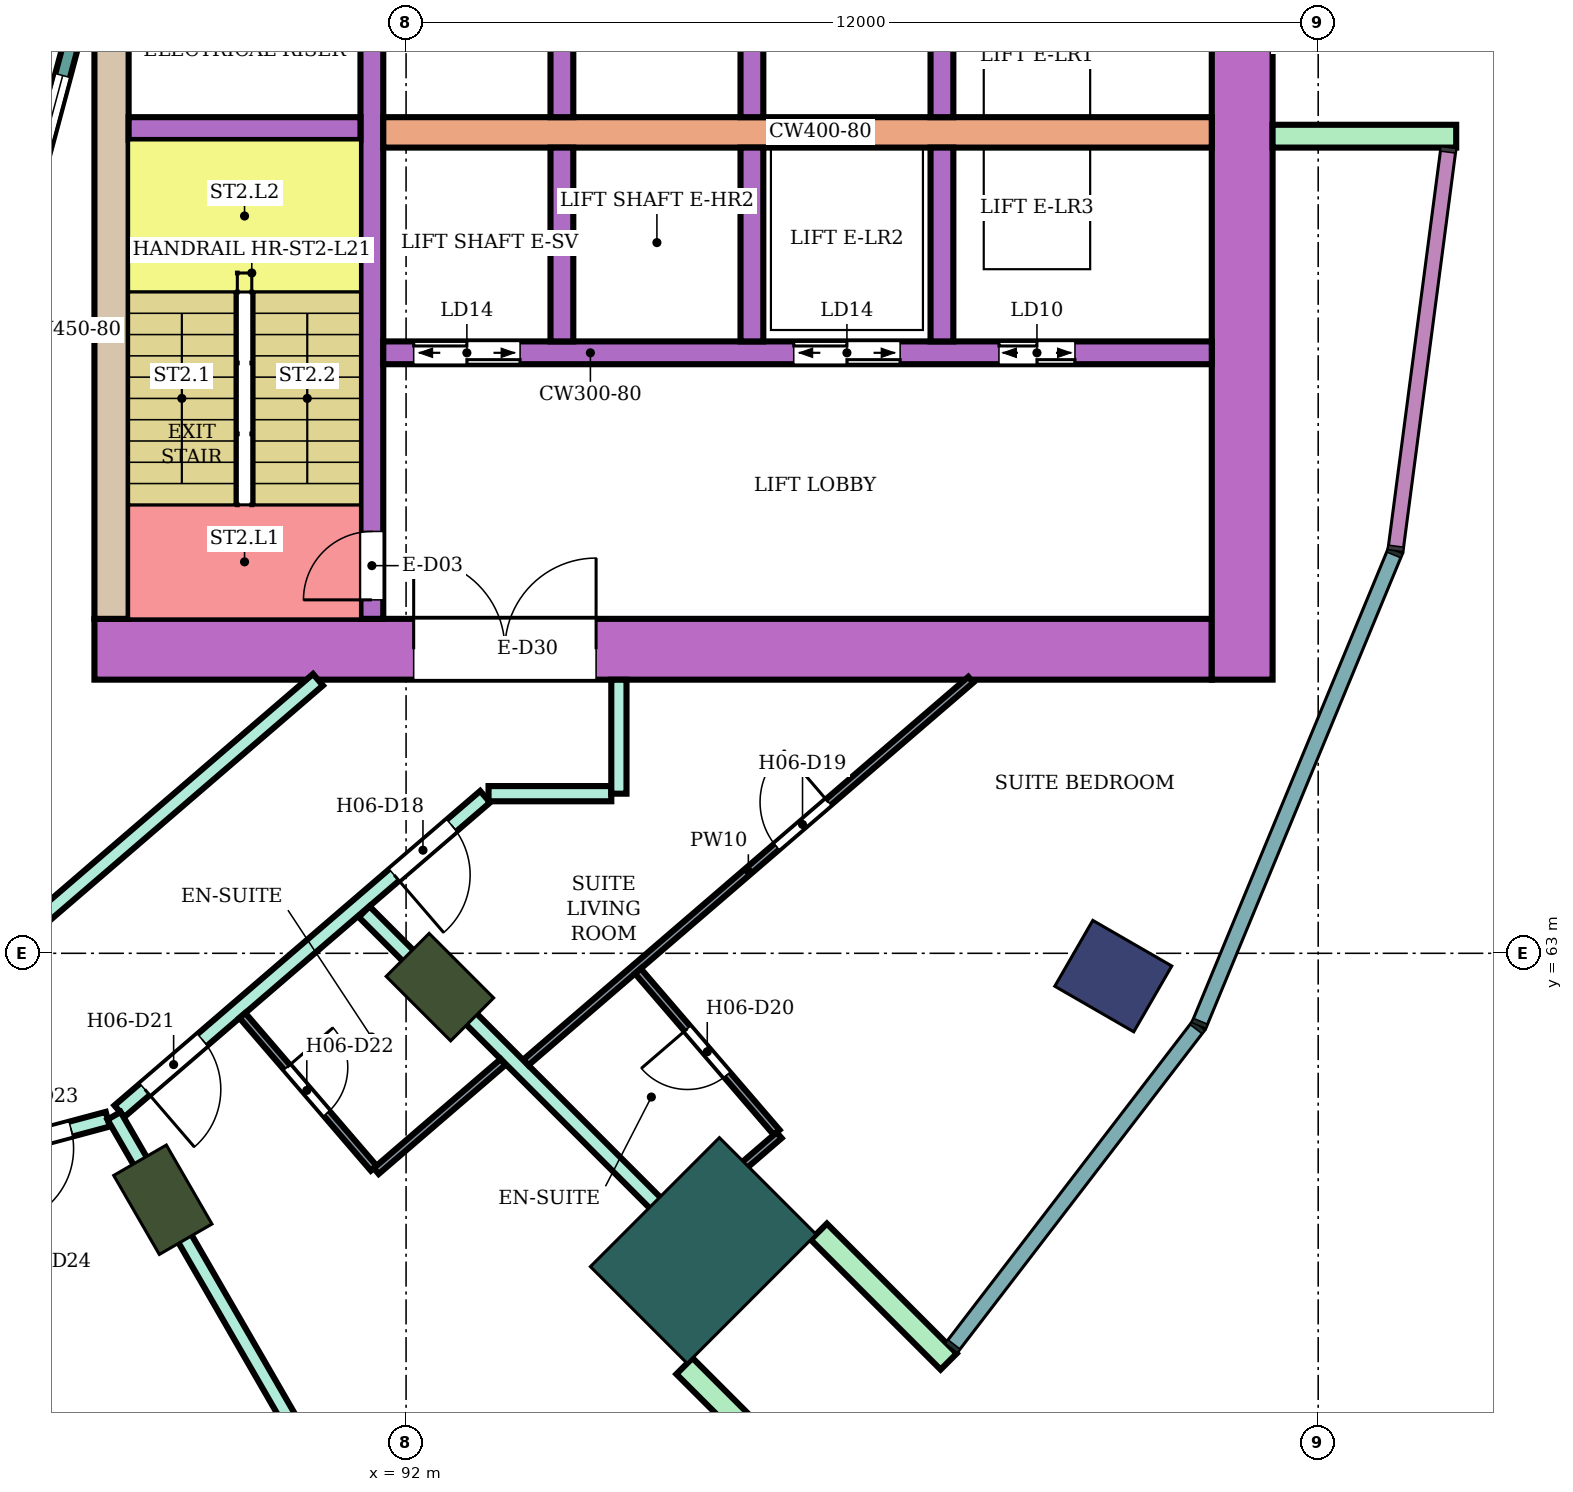
"""IFC4 building model, lengths in metres.
Left out: names, types, materials, properties, quantities, classifications, styles, units other than length and angle.
Written with IfcOpenShell. Run it as: python <this file> out.ifc"""

import sys

from ifc_helpers import new_model, si_unit, direction, frame, frame_2d, origin, origin_2d, place, context, subcontext, project, spatial, rectangle, extrude, element, fill, save


model = new_model("IFC4")
c1 = context("Model", 3, precision=1e-05, world=origin(), true_north=direction((0.0, 1.0)))
c2 = subcontext(c1, "Body", "Model", "MODEL_VIEW")
j1 = project(units=[si_unit("LENGTHUNIT", "METRE"), si_unit("PLANEANGLEUNIT", "RADIAN")], contexts=[c1])
p1 = place(None, origin())
s1 = spatial("IfcSite", under=j1, at=p1, CompositionType="ELEMENT")
p2 = place(p1, origin())
s2 = spatial("IfcBuilding", under=s1, at=p2, CompositionType="ELEMENT")
p3 = place(p2, frame((0.0, 0.0, 93.8)))
s3 = spatial("IfcBuildingStorey", under=s2, at=p3, CompositionType="ELEMENT", Elevation=93.8)
p4 = place(p3, frame((101.304, 62.7, 0.0), z_axis=(0.0, 0.0, 1.0), x_axis=(0.866025403784, -0.5, 0.0)))
e1 = element("IfcColumn", 1, at=p4, inside=s3, PredefinedType="COLUMN", context=c2, shape_type="SweptSolid", body=[
    extrude(rectangle(XDim=1.2, YDim=1.0, at=origin_2d()), origin(), (0.0, 0.0, 1.0), 3.8),
])
for number, where, z_axis, x_axis in (
    (2, (88.8, 59.758, 0.0), (0.0, 0.0, 1.0), (0.5, -0.866, 0.0)),
    (3, (92.445, 62.555, 0.0), (0.0, 0.0, 1.0), (0.707, -0.707, 0.0)),
):
    element("IfcColumn", number, at=place(p3, frame(where, z_axis=z_axis, x_axis=x_axis)), inside=s3, PredefinedType="COLUMN", context=c2, shape_type="SweptSolid", body=[
        extrude(rectangle(XDim=1.2, YDim=0.8, at=origin_2d()), origin(), (0.0, 0.0, 1.0), 3.8),
    ])
p5 = place(p3, frame((95.91, 59.09, 0.0), z_axis=(0.0, 0.0, 1.0), x_axis=(0.707106781187, -0.707106781187, 0.0)))
e4 = element("IfcColumn", 4, at=p5, inside=s3, PredefinedType="COLUMN", context=c2, shape_type="SweptSolid", body=[
    extrude(rectangle(XDim=1.8, YDim=2.4, at=origin_2d()), origin(), (0.0, 0.0, 1.0), 3.8),
])
p6 = place(p3, frame((87.9, 67.0, 0.0), z_axis=(0.0, 0.0, 1.0), x_axis=(1.0, 0.0, 0.0)))
e5 = element("IfcWall", 5, at=p6, inside=s3, PredefinedType="SHEAR", context=c2, shape_type="SweptSolid", body=[
    extrude(rectangle(XDim=14.7, YDim=0.8, at=frame_2d((7.35, 0.0))), origin(), (0.0, 0.0, 1.0), 3.48),
])
p7 = place(p6, frame((4.2, 0.0, 0.0)))
e6 = element("IfcOpeningElement", 6, at=p7, cuts=e5, PredefinedType="OPENING", context=c2, shape_type="SweptSolid", body=[
    extrude(rectangle(XDim=2.4, YDim=2.4, at=frame_2d((1.2, 1.2))), frame((0.0, 0.41, 0.0), z_axis=(0.0, -1.0, 0.0), x_axis=(1.0, 0.0, 0.0)), (0.0, 0.0, 1.0), 0.82),
])
p8 = place(p3, frame((88.125, 67.4, 0.0), z_axis=(0.0, 0.0, 1.0), x_axis=(0.0, 1.0, 0.0)))
e7 = element("IfcWall", 7, at=p8, inside=s3, PredefinedType="SHEAR", context=c2, shape_type="SweptSolid", body=[
    extrude(rectangle(XDim=7.6, YDim=0.45, at=frame_2d((3.8, 0.0))), origin(), (0.0, 0.0, 1.0), 3.48),
])
p9 = place(p3, frame((103.0, 66.6, 0.0), z_axis=(0.0, 0.0, 1.0), x_axis=(0.0, 1.0, 0.0)))
e8 = element("IfcWall", 8, at=p9, inside=s3, PredefinedType="SHEAR", context=c2, shape_type="SweptSolid", body=[
    extrude(rectangle(XDim=16.8, YDim=0.8, at=frame_2d((8.4, 0.0))), origin(), (0.0, 0.0, 1.0), 3.48),
])
p10 = place(p3, frame((91.55, 67.4, 0.0), z_axis=(0.0, 0.0, 1.0), x_axis=(0.0, 1.0, 0.0)))
e9 = element("IfcWall", 9, at=p10, inside=s3, PredefinedType="SHEAR", context=c2, shape_type="SweptSolid", body=[
    extrude(rectangle(XDim=7.6, YDim=0.3, at=frame_2d((3.8, 0.0))), origin(), (0.0, 0.0, 1.0), 3.48),
])
p11 = place(p10, frame((0.25, 0.0, 0.0)))
e10 = element("IfcOpeningElement", 10, at=p11, cuts=e9, PredefinedType="OPENING", context=c2, shape_type="SweptSolid", body=[
    extrude(rectangle(XDim=0.9, YDim=2.1, at=frame_2d((0.45, 1.05))), frame((0.0, 0.16, 0.0), z_axis=(0.0, -1.0, 0.0), x_axis=(1.0, 0.0, 0.0)), (0.0, 0.0, 1.0), 0.32),
])
p12 = place(p3, frame((88.35, 73.85, 0.0), z_axis=(0.0, 0.0, 1.0), x_axis=(1.0, 0.0, 0.0)))
e11 = element("IfcWall", 11, at=p12, inside=s3, PredefinedType="SHEAR", context=c2, shape_type="SweptSolid", body=[
    extrude(rectangle(XDim=3.05, YDim=0.3, at=frame_2d((1.525, 0.0))), origin(), (0.0, 0.0, 1.0), 3.48),
])
p13 = place(p3, frame((91.7, 73.8, 0.0), z_axis=(0.0, 0.0, 1.0), x_axis=(1.0, 0.0, 0.0)))
e12 = element("IfcWall", 12, at=p13, inside=s3, PredefinedType="SHEAR", context=c2, shape_type="SweptSolid", body=[
    extrude(rectangle(XDim=10.9, YDim=0.4, at=frame_2d((5.45, 0.0))), origin(), (0.0, 0.0, 1.0), 3.48),
])
p14 = place(p3, frame((91.7, 70.9, 0.0), z_axis=(0.0, 0.0, 1.0), x_axis=(1.0, 0.0, 0.0)))
e13 = element("IfcWall", 13, at=p14, inside=s3, PredefinedType="SHEAR", context=c2, shape_type="SweptSolid", body=[
    extrude(rectangle(XDim=10.9, YDim=0.3, at=frame_2d((5.45, 0.0))), origin(), (0.0, 0.0, 1.0), 3.48),
])
p15 = place(p14, frame((0.4, 0.0, 0.0)))
e14 = element("IfcOpeningElement", 14, at=p15, cuts=e13, PredefinedType="OPENING", context=c2, shape_type="SweptSolid", body=[
    extrude(rectangle(XDim=1.4, YDim=2.1, at=frame_2d((0.7, 1.05))), frame((0.0, 0.16, 0.0), z_axis=(0.0, -1.0, 0.0), x_axis=(1.0, 0.0, 0.0)), (0.0, 0.0, 1.0), 0.32),
])
p16 = place(p14, frame((5.4, 0.0, 0.0)))
e15 = element("IfcOpeningElement", 15, at=p16, cuts=e13, PredefinedType="OPENING", context=c2, shape_type="SweptSolid", body=[
    extrude(rectangle(XDim=1.4, YDim=2.1, at=frame_2d((0.7, 1.05))), frame((0.0, 0.16, 0.0), z_axis=(0.0, -1.0, 0.0), x_axis=(1.0, 0.0, 0.0)), (0.0, 0.0, 1.0), 0.32),
])
p17 = place(p14, frame((8.1, 0.0, 0.0)))
e16 = element("IfcOpeningElement", 16, at=p17, cuts=e13, PredefinedType="OPENING", context=c2, shape_type="SweptSolid", body=[
    extrude(rectangle(XDim=1.0, YDim=2.1, at=frame_2d((0.5, 1.05))), frame((0.0, 0.16, 0.0), z_axis=(0.0, -1.0, 0.0), x_axis=(1.0, 0.0, 0.0)), (0.0, 0.0, 1.0), 0.32),
])
for number, where, z_axis, x_axis in (
    (17, (94.05, 74.0, 0.0), (0.0, 0.0, 1.0), (0.0, 1.0, 0.0)),
    (18, (96.55, 74.0, 0.0), (0.0, 0.0, 1.0), (0.0, 1.0, 0.0)),
    (19, (99.05, 74.0, 0.0), (0.0, 0.0, 1.0), (0.0, 1.0, 0.0)),
    (20, (94.05, 71.05, 0.0), (0.0, 0.0, 1.0), (0.0, 1.0, 0.0)),
    (21, (96.55, 71.05, 0.0), (0.0, 0.0, 1.0), (0.0, 1.0, 0.0)),
    (22, (99.05, 71.05, 0.0), (0.0, 0.0, 1.0), (0.0, 1.0, 0.0)),
):
    element("IfcWall", number, at=place(p3, frame(where, z_axis=z_axis, x_axis=x_axis)), inside=s3, PredefinedType="SHEAR", context=c2, shape_type="SweptSolid", body=[
        extrude(rectangle(XDim=2.55, YDim=0.3, at=frame_2d((1.275, 0.0))), origin(), (0.0, 0.0, 1.0), 3.48),
    ])
for number, where, z_axis, x_axis in (
    (23, (103.4, 73.75, 0.0), (0.0, 0.0, 1.0), (1.0, 0.0, 0.0)),
    (24, (95.662, 57.57, 0.0), (0.0, 0.0, 1.0), (0.707, -0.707, 0.0)),
    (25, (97.43, 59.338, 0.0), (0.0, 0.0, 1.0), (0.707, -0.707, 0.0)),
):
    element("IfcWall", number, at=place(p3, frame(where, z_axis=z_axis, x_axis=x_axis)), inside=s3, PredefinedType="NOTDEFINED", context=c2, shape_type="SweptSolid", body=[
        extrude(rectangle(XDim=2.416, YDim=0.3, at=frame_2d((1.208, 0.0))), origin(), (0.0, 0.0, 1.0), 3.8),
    ])
p18 = place(p3, frame((86.585, 71.198, 0.0), z_axis=(0.0, 0.0, 1.0), x_axis=(0.258789828301, 0.965933654434, 0.0)))
e26 = element("IfcWall", 26, at=p18, inside=s3, PredefinedType="NOTDEFINED", context=c2, shape_type="SweptSolid", body=[
    extrude(rectangle(XDim=3.936, YDim=0.2, at=frame_2d((1.968, 0.0))), origin(), (0.0, 0.0, 1.0), 3.8),
])
p19 = place(p18, frame((0.468, 0.0, 0.9)))
e27 = element("IfcOpeningElement", 27, at=p19, cuts=e26, PredefinedType="OPENING", context=c2, shape_type="SweptSolid", body=[
    extrude(rectangle(XDim=3.0, YDim=2.3, at=frame_2d((1.5, 1.15))), frame((0.0, 0.11, 0.0), z_axis=(0.0, -1.0, 0.0), x_axis=(1.0, 0.0, 0.0)), (0.0, 0.0, 1.0), 0.22),
])
p20 = place(p3, frame((80.0, 58.655, 0.0), z_axis=(0.0, 0.0, 1.0), x_axis=(0.965967338894, 0.258664068224, 0.0)))
e28 = element("IfcWall", 28, at=p20, inside=s3, PredefinedType="PARTITIONING", context=c2, shape_type="SweptSolid", body=[
    extrude(rectangle(XDim=8.36, YDim=0.2, at=frame_2d((4.18, 0.0))), origin(), (0.0, 0.0, 1.0), 3.35),
])
p21 = place(p20, frame((6.86, 0.0, 0.0)))
e29 = element("IfcOpeningElement", 29, at=p21, cuts=e28, PredefinedType="OPENING", context=c2, shape_type="SweptSolid", body=[
    extrude(rectangle(XDim=1.0, YDim=2.1, at=frame_2d((0.5, 1.05))), frame((0.0, 0.11, 0.0), z_axis=(0.0, -1.0, 0.0), x_axis=(1.0, 0.0, 0.0)), (0.0, 0.0, 1.0), 0.22),
])
p22 = place(p3, frame((86.877, 63.189, 0.0), z_axis=(0.0, 0.0, 1.0), x_axis=(0.758088707506, 0.652151448325, 0.0)))
e30 = element("IfcWall", 30, at=p22, inside=s3, PredefinedType="PARTITIONING", context=c2, shape_type="SweptSolid", body=[
    extrude(rectangle(XDim=5.229, YDim=0.2, at=frame_2d((2.615, 0.0))), origin(), (0.0, 0.0, 1.0), 3.35),
])
p23 = place(p3, frame((88.229, 60.923, 0.0), z_axis=(0.0, 0.0, 1.0), x_axis=(0.758220952094, 0.651997690031, 0.0)))
e31 = element("IfcWall", 31, at=p23, inside=s3, PredefinedType="PARTITIONING", context=c2, shape_type="SweptSolid", body=[
    extrude(rectangle(XDim=6.346, YDim=0.2, at=frame_2d((3.173, 0.0))), origin(), (0.0, 0.0, 1.0), 3.35),
])
p24 = place(p23, frame((4.767, 0.0, 0.0)))
e32 = element("IfcOpeningElement", 32, at=p24, cuts=e31, PredefinedType="OPENING", context=c2, shape_type="SweptSolid", body=[
    extrude(rectangle(XDim=1.0, YDim=2.1, at=frame_2d((0.5, 1.05))), frame((0.0, 0.11, 0.0), z_axis=(0.0, -1.0, 0.0), x_axis=(1.0, 0.0, 0.0)), (0.0, 0.0, 1.0), 0.22),
])
p25 = place(p23, frame((0.44, 0.0, 0.0)))
e33 = element("IfcOpeningElement", 33, at=p25, cuts=e31, PredefinedType="OPENING", context=c2, shape_type="SweptSolid", body=[
    extrude(rectangle(XDim=1.0, YDim=2.1, at=frame_2d((0.5, 1.05))), frame((0.0, 0.11, 0.0), z_axis=(0.0, -1.0, 0.0), x_axis=(1.0, 0.0, 0.0)), (0.0, 0.0, 1.0), 0.22),
])
p26 = place(p3, frame((88.158, 60.862, 0.0), z_axis=(0.0, 0.0, 1.0), x_axis=(0.499916512745, -0.866073599808, 0.0)))
e34 = element("IfcWall", 34, at=p26, inside=s3, PredefinedType="PARTITIONING", context=c2, shape_type="SweptSolid", body=[
    extrude(rectangle(XDim=9.475, YDim=0.2, at=frame_2d((4.737, 0.0))), origin(), (0.0, 0.0, 1.0), 3.35),
])
p27 = place(p3, frame((91.448, 63.547, 0.0), z_axis=(0.0, 0.0, 1.0), x_axis=(0.706949958062, -0.707263569538, 0.0)))
e35 = element("IfcWall", 35, at=p27, inside=s3, PredefinedType="PARTITIONING", context=c2, shape_type="SweptSolid", body=[
    extrude(rectangle(XDim=7.006, YDim=0.2, at=frame_2d((3.503, 0.0))), origin(), (0.0, 0.0, 1.0), 3.35),
])
p28 = place(p3, frame((93.085, 65.1, 0.0), z_axis=(0.0, 0.0, 1.0), x_axis=(1.0, 0.0, 0.0)))
e36 = element("IfcWall", 36, at=p28, inside=s3, PredefinedType="PARTITIONING", context=c2, shape_type="SweptSolid", body=[
    extrude(rectangle(XDim=1.615, YDim=0.2, at=frame_2d((0.808, 0.0))), origin(), (0.0, 0.0, 1.0), 3.35),
])
p29 = place(p3, frame((94.8, 65.1, 0.0), z_axis=(0.0, 0.0, 1.0), x_axis=(0.0, 1.0, 0.0)))
e37 = element("IfcWall", 37, at=p29, inside=s3, PredefinedType="PARTITIONING", context=c2, shape_type="SweptSolid", body=[
    extrude(rectangle(XDim=1.499, YDim=0.2, at=frame_2d((0.75, 0.0))), origin(), (0.0, 0.0, 1.0), 3.35),
])
p30 = place(p3, frame((89.846, 62.182, 0.0), z_axis=(0.0, 0.0, 1.0), x_axis=(0.652095405055, -0.758136915541, 0.0)))
e38 = element("IfcWall", 38, at=p30, inside=s3, PredefinedType="PARTITIONING", context=c2, shape_type="SweptSolid", body=[
    extrude(rectangle(XDim=2.65, YDim=0.1, at=frame_2d((1.325, 0.0))), origin(), (0.0, 0.0, 1.0), 3.35),
])
p31 = place(p30, frame((0.9, 0.0, 0.0)))
e39 = element("IfcOpeningElement", 39, at=p31, cuts=e38, PredefinedType="OPENING", context=c2, shape_type="SweptSolid", body=[
    extrude(rectangle(XDim=0.8, YDim=2.1, at=frame_2d((0.4, 1.05))), frame((0.0, 0.06, 0.0), z_axis=(0.0, -1.0, 0.0), x_axis=(1.0, 0.0, 0.0)), (0.0, 0.0, 1.0), 0.12),
])
p32 = place(p3, frame((91.607, 60.135, 0.0), z_axis=(0.0, 0.0, 1.0), x_axis=(0.758135842672, 0.652096652388, 0.0)))
e40 = element("IfcWall", 40, at=p32, inside=s3, PredefinedType="PARTITIONING", context=c2, shape_type="SweptSolid", body=[
    extrude(rectangle(XDim=2.201, YDim=0.1, at=frame_2d((1.101, 0.0))), origin(), (0.0, 0.0, 1.0), 3.35),
])
p33 = place(p3, frame((93.577, 61.565, 0.0), z_axis=(0.0, 0.0, 1.0), x_axis=(0.75812140399, 0.652113438607, 0.0)))
e41 = element("IfcWall", 41, at=p33, inside=s3, PredefinedType="PARTITIONING", context=c2, shape_type="SweptSolid", body=[
    extrude(rectangle(XDim=7.72, YDim=0.1, at=frame_2d((3.86, 0.0))), origin(), (0.0, 0.0, 1.0), 3.35),
])
p34 = place(p33, frame((4.35, 0.0, 0.0)))
e42 = element("IfcOpeningElement", 42, at=p34, cuts=e41, PredefinedType="OPENING", context=c2, shape_type="SweptSolid", body=[
    extrude(rectangle(XDim=0.9, YDim=2.1, at=frame_2d((0.45, 1.05))), frame((0.0, 0.06, 0.0), z_axis=(0.0, -1.0, 0.0), x_axis=(1.0, 0.0, 0.0)), (0.0, 0.0, 1.0), 0.12),
])
p35 = place(p3, frame((95.05, 62.766, 0.0), z_axis=(0.0, 0.0, 1.0), x_axis=(0.652190642827, -0.75805498838, 0.0)))
e43 = element("IfcWall", 43, at=p35, inside=s3, PredefinedType="PARTITIONING", context=c2, shape_type="SweptSolid", body=[
    extrude(rectangle(XDim=2.8, YDim=0.1, at=frame_2d((1.4, 0.0))), origin(), (0.0, 0.0, 1.0), 3.35),
])
p36 = place(p35, frame((1.0, 0.0, 0.0)))
e44 = element("IfcOpeningElement", 44, at=p36, cuts=e43, PredefinedType="OPENING", context=c2, shape_type="SweptSolid", body=[
    extrude(rectangle(XDim=0.8, YDim=2.1, at=frame_2d((0.4, 1.05))), frame((0.0, 0.06, 0.0), z_axis=(0.0, -1.0, 0.0), x_axis=(1.0, 0.0, 0.0)), (0.0, 0.0, 1.0), 0.12),
])
p37 = place(p3, frame((95.634, 59.509, 0.0), z_axis=(0.0, 0.0, 1.0), x_axis=(0.757922369717, 0.652344756614, 0.0)))
e45 = element("IfcWall", 45, at=p37, inside=s3, PredefinedType="PARTITIONING", context=c2, shape_type="SweptSolid", body=[
    extrude(rectangle(XDim=1.681, YDim=0.1, at=frame_2d((0.841, 0.0))), origin(), (0.0, 0.0, 1.0), 3.35),
])
p38 = place(p19, origin())
e46 = element("IfcWindow", 46, at=p38, inside=s3, PartitioningType="SINGLE_PANEL", PredefinedType="WINDOW", context=c2, shape_type="SweptSolid", body=[
    extrude(rectangle(XDim=3.0, YDim=2.3, at=frame_2d((1.5, 1.15))), frame((0.0, 0.03, 0.0), z_axis=(0.0, -1.0, 0.0), x_axis=(1.0, 0.0, 0.0)), (0.0, 0.0, 1.0), 0.06),
])
fill(e27, e46)
p39 = place(p24, frame((1.0, 0.0, 0.0), z_axis=(0.0, 0.0, 1.0), x_axis=(-1.0, 0.0, 0.0)))
e47 = element("IfcDoor", 47, at=p39, inside=s3, OperationType="SINGLE_SWING_RIGHT", PredefinedType="DOOR", context=c2, shape_type="SweptSolid", body=[
    extrude(rectangle(XDim=1.0, YDim=2.1, at=frame_2d((0.5, 1.05))), frame((0.0, 0.025, 0.0), z_axis=(0.0, -1.0, 0.0), x_axis=(1.0, 0.0, 0.0)), (0.0, 0.0, 1.0), 0.05),
])
fill(e32, e47)
p40 = place(p34, origin())
e48 = element("IfcDoor", 48, at=p40, inside=s3, OperationType="SINGLE_SWING_RIGHT", PredefinedType="DOOR", context=c2, shape_type="SweptSolid", body=[
    extrude(rectangle(XDim=0.9, YDim=2.1, at=frame_2d((0.45, 1.05))), frame((0.0, 0.025, 0.0), z_axis=(0.0, -1.0, 0.0), x_axis=(1.0, 0.0, 0.0)), (0.0, 0.0, 1.0), 0.05),
])
fill(e42, e48)
p41 = place(p36, frame((0.8, 0.0, 0.0), z_axis=(0.0, 0.0, 1.0), x_axis=(-1.0, 0.0, 0.0)))
e49 = element("IfcDoor", 49, at=p41, inside=s3, OperationType="SINGLE_SWING_RIGHT", PredefinedType="DOOR", context=c2, shape_type="SweptSolid", body=[
    extrude(rectangle(XDim=0.8, YDim=2.1, at=frame_2d((0.4, 1.05))), frame((0.0, 0.025, 0.0), z_axis=(0.0, -1.0, 0.0), x_axis=(1.0, 0.0, 0.0)), (0.0, 0.0, 1.0), 0.05),
])
fill(e44, e49)
p42 = place(p25, frame((1.0, 0.0, 0.0), z_axis=(0.0, 0.0, 1.0), x_axis=(-1.0, 0.0, 0.0)))
e50 = element("IfcDoor", 50, at=p42, inside=s3, OperationType="SINGLE_SWING_RIGHT", PredefinedType="DOOR", context=c2, shape_type="SweptSolid", body=[
    extrude(rectangle(XDim=1.0, YDim=2.1, at=frame_2d((0.5, 1.05))), frame((0.0, 0.025, 0.0), z_axis=(0.0, -1.0, 0.0), x_axis=(1.0, 0.0, 0.0)), (0.0, 0.0, 1.0), 0.05),
])
fill(e33, e50)
p43 = place(p31, origin())
e51 = element("IfcDoor", 51, at=p43, inside=s3, OperationType="SINGLE_SWING_LEFT", PredefinedType="DOOR", context=c2, shape_type="SweptSolid", body=[
    extrude(rectangle(XDim=0.8, YDim=2.1, at=frame_2d((0.4, 1.05))), frame((0.0, 0.025, 0.0), z_axis=(0.0, -1.0, 0.0), x_axis=(1.0, 0.0, 0.0)), (0.0, 0.0, 1.0), 0.05),
])
fill(e39, e51)
p44 = place(p21, frame((1.0, 0.0, 0.0), z_axis=(0.0, 0.0, 1.0), x_axis=(-1.0, 0.0, 0.0)))
e52 = element("IfcDoor", 52, at=p44, inside=s3, OperationType="SINGLE_SWING_RIGHT", PredefinedType="DOOR", context=c2, shape_type="SweptSolid", body=[
    extrude(rectangle(XDim=1.0, YDim=2.1, at=frame_2d((0.5, 1.05))), frame((0.0, 0.025, 0.0), z_axis=(0.0, -1.0, 0.0), x_axis=(1.0, 0.0, 0.0)), (0.0, 0.0, 1.0), 0.05),
])
fill(e29, e52)
p45 = place(p11, origin())
e53 = element("IfcDoor", 53, at=p45, inside=s3, OperationType="SINGLE_SWING_LEFT", PredefinedType="DOOR", context=c2, shape_type="SweptSolid", body=[
    extrude(rectangle(XDim=0.9, YDim=2.1, at=frame_2d((0.45, 1.05))), frame((0.0, 0.025, 0.0), z_axis=(0.0, -1.0, 0.0), x_axis=(1.0, 0.0, 0.0)), (0.0, 0.0, 1.0), 0.05),
])
fill(e10, e53)
p46 = place(p15, origin())
e54 = element("IfcDoor", 54, at=p46, inside=s3, OperationType="DOUBLE_DOOR_SLIDING", PredefinedType="DOOR", context=c2, shape_type="SweptSolid", body=[
    extrude(rectangle(XDim=1.4, YDim=2.1, at=frame_2d((0.7, 1.05))), frame((0.0, 0.025, 0.0), z_axis=(0.0, -1.0, 0.0), x_axis=(1.0, 0.0, 0.0)), (0.0, 0.0, 1.0), 0.05),
])
fill(e14, e54)
p47 = place(p16, origin())
e55 = element("IfcDoor", 55, at=p47, inside=s3, OperationType="DOUBLE_DOOR_SLIDING", PredefinedType="DOOR", context=c2, shape_type="SweptSolid", body=[
    extrude(rectangle(XDim=1.4, YDim=2.1, at=frame_2d((0.7, 1.05))), frame((0.0, 0.025, 0.0), z_axis=(0.0, -1.0, 0.0), x_axis=(1.0, 0.0, 0.0)), (0.0, 0.0, 1.0), 0.05),
])
fill(e15, e55)
p48 = place(p17, origin())
e56 = element("IfcDoor", 56, at=p48, inside=s3, OperationType="DOUBLE_DOOR_SLIDING", PredefinedType="DOOR", context=c2, shape_type="SweptSolid", body=[
    extrude(rectangle(XDim=1.0, YDim=2.1, at=frame_2d((0.5, 1.05))), frame((0.0, 0.025, 0.0), z_axis=(0.0, -1.0, 0.0), x_axis=(1.0, 0.0, 0.0)), (0.0, 0.0, 1.0), 0.05),
])
fill(e16, e56)
p49 = place(p7, origin())
e57 = element("IfcDoor", 57, at=p49, inside=s3, OperationType="DOUBLE_DOOR_SINGLE_SWING", PredefinedType="DOOR", context=c2, shape_type="SweptSolid", body=[
    extrude(rectangle(XDim=2.4, YDim=2.4, at=frame_2d((1.2, 1.2))), frame((0.0, 0.025, 0.0), z_axis=(0.0, -1.0, 0.0), x_axis=(1.0, 0.0, 0.0)), (0.0, 0.0, 1.0), 0.05),
])
fill(e6, e57)
save(model, sys.argv[1])
